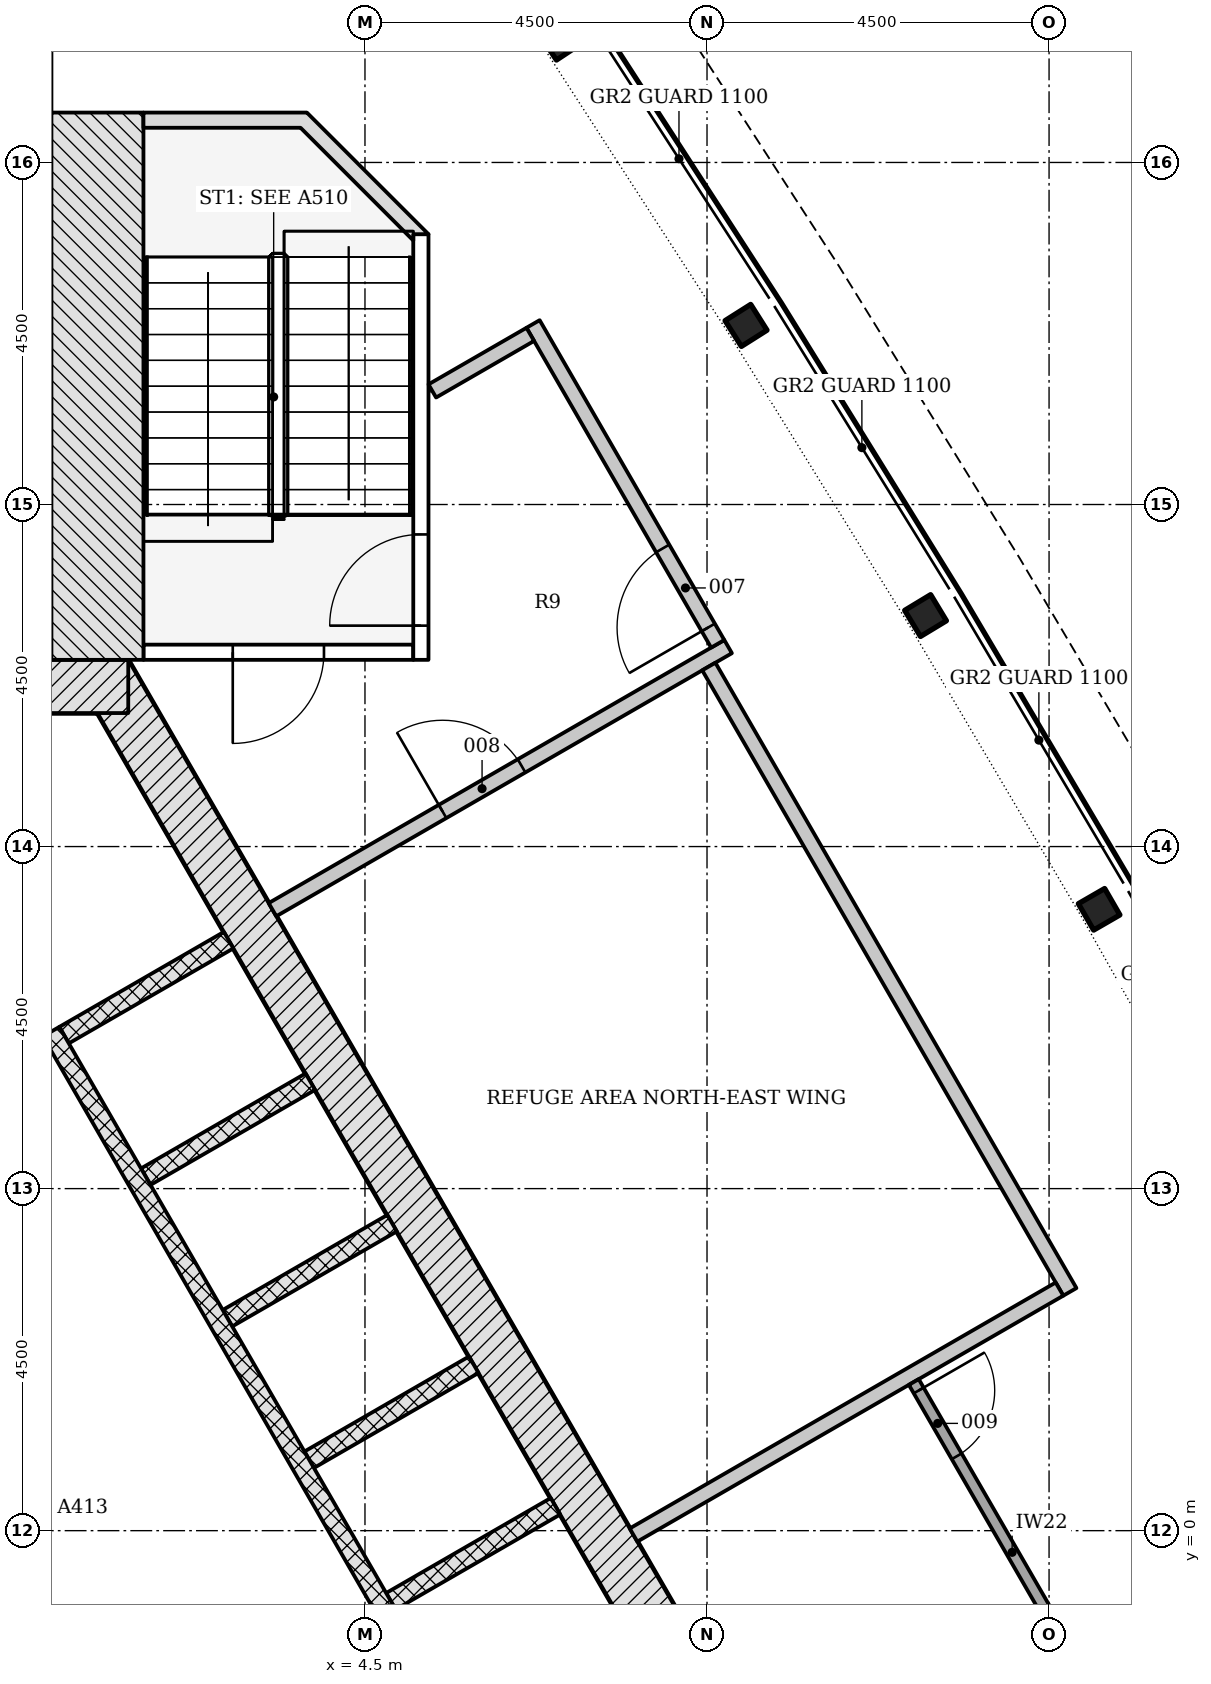
"""IFC4 building model, lengths in metres.
Left out: names, types, materials, properties, quantities, classifications, styles, units other than length and angle.
Written with IfcOpenShell. Run it as: python <this file> out.ifc"""

import sys

from ifc_helpers import new_model, si_unit, direction, frame, frame_2d, origin, origin_2d, place, context, subcontext, project, spatial, polyline, rectangle, i_section, outline, extrude, element, fill, save


model = new_model("IFC4")
c1 = context("Model", 3, precision=1e-05, world=origin(), true_north=direction((0.0, 1.0)))
c2 = subcontext(c1, "Body", "Model", "MODEL_VIEW")
j1 = project(units=[si_unit("LENGTHUNIT", "METRE"), si_unit("PLANEANGLEUNIT", "RADIAN")], contexts=[c1])
p1 = place(None, origin())
s1 = spatial("IfcSite", under=j1, at=p1, CompositionType="ELEMENT")
p2 = place(p1, origin())
s2 = spatial("IfcBuilding", under=s1, at=p2, CompositionType="ELEMENT")
p3 = place(p2, frame((0.0, 0.0, 127.5)))
s3 = spatial("IfcBuildingStorey", under=s2, at=p3, CompositionType="ELEMENT", Elevation=127.5)
p4 = place(p3, frame((10.311, -4.703, -0.3), z_axis=(0.0, 0.0, 1.0), x_axis=(-0.500001446645, 0.866024568562, 0.0)))
e1 = element("IfcWall", 1, at=p4, inside=s3, PredefinedType="SHEAR", context=c2, shape_type="SweptSolid", body=[
    extrude(rectangle(XDim=18.458, YDim=0.7, at=frame_2d((9.229, 0.0))), origin(), (0.0, 0.0, 1.0), 7.2),
])
p5 = place(p3, frame((1.386, 11.106, -0.3), z_axis=(0.0, 0.0, 1.0), x_axis=(-1.0, 0.0, 0.0)))
e2 = element("IfcWall", 2, at=p5, inside=s3, PredefinedType="SHEAR", context=c2, shape_type="SweptSolid", body=[
    extrude(rectangle(XDim=2.771, YDim=0.7, at=frame_2d((1.386, 0.0))), origin(), (0.0, 0.0, 1.0), 7.2),
])
for number, where, z_axis, x_axis in (
    (3, (14.159, 8.175, -0.3), (0.0, 0.0, 1.0), (-0.5, 0.866, 0.0)),
    (4, (11.875, 12.039, -0.3), (0.0, 0.0, 1.0), (-0.517, 0.856, 0.0)),
    (5, (9.513, 15.856, -0.3), (0.0, 0.0, 1.0), (-0.535, 0.845, 0.0)),
    (6, (7.075, 19.625, -0.3), (0.0, 0.0, 1.0), (-0.552, 0.834, 0.0)),
):
    element("IfcColumn", number, at=place(p3, frame(where, z_axis=z_axis, x_axis=x_axis)), inside=s3, PredefinedType="COLUMN", context=c2, shape_type="SweptSolid", body=[
        extrude(i_section(OverallWidth=0.401, OverallDepth=0.399, WebThickness=0.025, FlangeThickness=0.04, FilletRadius=0.015, at=origin_2d()), origin(), (0.0, 0.0, 1.0), 7.2),
    ])
p6 = place(p3, frame((7.006, 0.321, 0.0), z_axis=(0.0, 0.0, 1.0), x_axis=(-0.866022959057, -0.500004234368, 0.0)))
e7 = element("IfcWall", 7, at=p6, inside=s3, PredefinedType="PARTITIONING", context=c2, shape_type="SweptSolid", body=[
    extrude(rectangle(XDim=2.5, YDim=0.25, at=frame_2d((1.25, 0.0))), origin(), (0.0, 0.0, 1.0), 6.9),
])
p7 = place(p3, frame((5.931, 2.183, 0.0), z_axis=(0.0, 0.0, 1.0), x_axis=(-0.866047370643, -0.499961950354, 0.0)))
e8 = element("IfcWall", 8, at=p7, inside=s3, PredefinedType="PARTITIONING", context=c2, shape_type="SweptSolid", body=[
    extrude(rectangle(XDim=2.5, YDim=0.25, at=frame_2d((1.25, 0.0))), origin(), (0.0, 0.0, 1.0), 6.9),
])
for number, where, z_axis, x_axis in (
    (9, (4.856, 4.045, 0.0), (0.0, 0.0, 1.0), (-0.866, -0.5, 0.0)),
    (10, (3.781, 5.907, 0.0), (0.0, 0.0, 1.0), (-0.866, -0.5, 0.0)),
    (11, (2.706, 7.769, 0.0), (0.0, 0.0, 1.0), (-0.866, -0.5, 0.0)),
):
    element("IfcWall", number, at=place(p3, frame(where, z_axis=z_axis, x_axis=x_axis)), inside=s3, PredefinedType="PARTITIONING", context=c2, shape_type="SweptSolid", body=[
        extrude(rectangle(XDim=2.5, YDim=0.25, at=frame_2d((1.25, 0.0))), origin(), (0.0, 0.0, 1.0), 6.9),
    ])
p8 = place(p3, frame((5.87, -2.961, 0.0), z_axis=(0.0, 0.0, 1.0), x_axis=(-0.50000615651, 0.866021849293, 0.0)))
e12 = element("IfcWall", 12, at=p8, inside=s3, PredefinedType="PARTITIONING", context=c2, shape_type="SweptSolid", body=[
    extrude(rectangle(XDim=11.0, YDim=0.25, at=frame_2d((5.5, 0.0))), origin(), (0.0, 0.0, 1.0), 6.9),
])
p9 = place(p3, frame((5.135, 11.556, -0.3), z_axis=(0.0, 0.0, 1.0), x_axis=(-1.0, 0.0, 0.0)))
e13 = element("IfcWall", 13, at=p9, inside=s3, PredefinedType="SHEAR", context=c2, shape_type="SweptSolid", body=[
    extrude(rectangle(XDim=3.55, YDim=0.2, at=frame_2d((1.775, 0.0))), origin(), (0.0, 0.0, 1.0), 7.2),
])
p10 = place(p9, frame((1.175, 0.0, 0.3)))
e14 = element("IfcOpeningElement", 14, at=p10, cuts=e13, PredefinedType="OPENING", context=c2, shape_type="SweptSolid", body=[
    extrude(rectangle(XDim=1.2, YDim=2.1, at=frame_2d((0.6, 1.05))), frame((0.0, 0.11, 0.0), z_axis=(0.0, -1.0, 0.0), x_axis=(1.0, 0.0, 0.0)), (0.0, 0.0, 1.0), 0.22),
])
p11 = place(p3, frame((5.236, 11.456, -0.3), z_axis=(0.0, 0.0, 1.0), x_axis=(0.0, 1.0, 0.0)))
e15 = element("IfcWall", 15, at=p11, inside=s3, PredefinedType="SHEAR", context=c2, shape_type="SweptSolid", body=[
    extrude(rectangle(XDim=5.6, YDim=0.2, at=frame_2d((2.8, 0.0))), origin(), (0.0, 0.0, 1.0), 7.2),
])
p12 = place(p11, frame((0.45, 0.0, 0.3)))
e16 = element("IfcOpeningElement", 16, at=p12, cuts=e15, PredefinedType="OPENING", context=c2, shape_type="SweptSolid", body=[
    extrude(rectangle(XDim=1.2, YDim=2.1, at=frame_2d((0.6, 1.05))), frame((0.0, 0.11, 0.0), z_axis=(0.0, -1.0, 0.0), x_axis=(1.0, 0.0, 0.0)), (0.0, 0.0, 1.0), 0.22),
])
p13 = place(p3, frame((0.98, 11.456, -0.3), z_axis=(0.0, 0.0, 1.0), x_axis=(0.0, 1.0, 0.0)))
e17 = element("IfcWall", 17, at=p13, inside=s3, PredefinedType="SHEAR", context=c2, shape_type="SweptSolid", body=[
    extrude(rectangle(XDim=7.2, YDim=1.211, at=frame_2d((3.6, 0.0))), origin(), (0.0, 0.0, 1.0), 7.2),
])
p14 = place(p3, frame((0.0, 0.0, -0.3)))
e18 = element("IfcWall", 18, at=p14, inside=s3, PredefinedType="SHEAR", context=c2, shape_type="SweptSolid", body=[
    extrude(outline(polyline([(5.336, 17.056), (3.736, 18.656), (1.586, 18.656), (1.586, 18.456), (3.653, 18.456), (5.135, 16.974), (5.135, 17.056), (5.135, 17.056), (5.135, 17.056), (5.135, 17.056), (5.135, 17.056), (5.135, 17.056), (5.135, 17.056), (5.135, 17.056), (5.135, 17.056), (5.135, 17.056), (5.135, 17.056), (5.135, 17.056), (5.135, 17.056), (5.135, 17.056), (5.135, 17.056), (5.135, 17.056), (5.135, 17.056), (5.336, 17.056)])), origin(), (0.0, 0.0, 1.0), 7.2),
])
p15 = place(p3, frame((3.283, 8.17, 0.0), z_axis=(0.0, 0.0, 1.0), x_axis=(0.866035807126, 0.499981980451, 0.0)))
e19 = element("IfcWall", 19, at=p15, inside=s3, PredefinedType="PARTITIONING", context=c2, shape_type="SweptSolid", body=[
    extrude(rectangle(XDim=6.922, YDim=0.2, at=frame_2d((3.461, 0.0))), origin(), (0.0, 0.0, 1.0), 6.9),
])
p16 = place(p15, frame((2.584, 0.0, 0.0)))
e20 = element("IfcOpeningElement", 20, at=p16, cuts=e19, PredefinedType="OPENING", context=c2, shape_type="SweptSolid", body=[
    extrude(rectangle(XDim=1.2, YDim=2.1, at=frame_2d((0.6, 1.05))), frame((0.0, 0.11, 0.0), z_axis=(0.0, -1.0, 0.0), x_axis=(1.0, 0.0, 0.0)), (0.0, 0.0, 1.0), 0.22),
])
p17 = place(p3, frame((9.024, 11.369, 0.0), z_axis=(0.0, 0.0, 1.0), x_axis=(0.499997557548, -0.86602681393, 0.0)))
e21 = element("IfcWall", 21, at=p17, inside=s3, PredefinedType="PARTITIONING", context=c2, shape_type="SweptSolid", body=[
    extrude(rectangle(XDim=9.5, YDim=0.2, at=frame_2d((4.75, 0.0))), origin(), (0.0, 0.0, 1.0), 6.347),
])
p18 = place(p3, frame((9.141, 11.667, 0.0), z_axis=(0.0, 0.0, 1.0), x_axis=(-0.500013872438, 0.86601739438, 0.0)))
e22 = element("IfcWall", 22, at=p18, inside=s3, PredefinedType="PARTITIONING", context=c2, shape_type="SweptSolid", body=[
    extrude(rectangle(XDim=4.859, YDim=0.2, at=frame_2d((2.429, 0.0))), origin(), (0.0, 0.0, 1.0), 6.423),
])
p19 = place(p18, frame((0.249, 0.0, 0.0)))
e23 = element("IfcOpeningElement", 23, at=p19, cuts=e22, PredefinedType="OPENING", context=c2, shape_type="SweptSolid", body=[
    extrude(rectangle(XDim=1.2, YDim=2.1, at=frame_2d((0.6, 1.05))), frame((0.0, 0.11, 0.0), z_axis=(0.0, -1.0, 0.0), x_axis=(1.0, 0.0, 0.0)), (0.0, 0.0, 1.0), 0.22),
])
p20 = place(p3, frame((6.675, 15.739, 0.0), z_axis=(0.0, 0.0, 1.0), x_axis=(-0.866024464444, -0.500001626982, 0.0)))
e24 = element("IfcWall", 24, at=p20, inside=s3, PredefinedType="PARTITIONING", context=c2, shape_type="SweptSolid", body=[
    extrude(rectangle(XDim=1.489, YDim=0.2, at=frame_2d((0.744, 0.0))), origin(), (0.0, 0.0, 1.0), 6.9),
])
p21 = place(p3, frame((8.033, -0.058, 0.0), z_axis=(0.0, 0.0, 1.0), x_axis=(0.866017203851, 0.500014202433, 0.0)))
e25 = element("IfcWall", 25, at=p21, inside=s3, PredefinedType="PARTITIONING", context=c2, shape_type="SweptSolid", body=[
    extrude(rectangle(XDim=6.471, YDim=0.2, at=frame_2d((3.235, 0.0))), origin(), (0.0, 0.0, 1.0), 6.9),
])
p22 = place(p3, frame((11.72, 1.956, 0.0), z_axis=(0.0, 0.0, 1.0), x_axis=(0.500020560727, -0.866013532718, 0.0)))
e26 = element("IfcWall", 26, at=p22, inside=s3, PredefinedType="PARTITIONING", context=c2, shape_type="SweptSolid", body=[
    extrude(rectangle(XDim=5.175, YDim=0.15, at=frame_2d((2.587, 0.0))), origin(), (0.0, 0.0, 1.0), 6.347),
])
p23 = place(p22, frame((0.129, 0.0, 0.0)))
e27 = element("IfcOpeningElement", 27, at=p23, cuts=e26, PredefinedType="OPENING", context=c2, shape_type="SweptSolid", body=[
    extrude(rectangle(XDim=1.0, YDim=2.1, at=frame_2d((0.5, 1.05))), frame((0.0, 0.085, 0.0), z_axis=(0.0, -1.0, 0.0), x_axis=(1.0, 0.0, 0.0)), (0.0, 0.0, 1.0), 0.17),
])
p24 = place(p10, origin())
e28 = element("IfcDoor", 28, at=p24, inside=s3, OperationType="SINGLE_SWING_RIGHT", PredefinedType="DOOR", context=c2, shape_type="SweptSolid", body=[
    extrude(rectangle(XDim=1.2, YDim=2.1, at=frame_2d((0.6, 1.05))), frame((0.0, 0.025, 0.0), z_axis=(0.0, -1.0, 0.0), x_axis=(1.0, 0.0, 0.0)), (0.0, 0.0, 1.0), 0.05),
])
fill(e14, e28)
p25 = place(p12, origin())
e29 = element("IfcDoor", 29, at=p25, inside=s3, OperationType="SINGLE_SWING_LEFT", PredefinedType="DOOR", context=c2, shape_type="SweptSolid", body=[
    extrude(rectangle(XDim=1.2, YDim=2.1, at=frame_2d((0.6, 1.05))), frame((0.0, 0.025, 0.0), z_axis=(0.0, -1.0, 0.0), x_axis=(1.0, 0.0, 0.0)), (0.0, 0.0, 1.0), 0.05),
])
fill(e16, e29)
p26 = place(p19, origin())
e30 = element("IfcDoor", 30, at=p26, inside=s3, OperationType="SINGLE_SWING_LEFT", PredefinedType="DOOR", context=c2, shape_type="SweptSolid", body=[
    extrude(rectangle(XDim=1.2, YDim=2.1, at=frame_2d((0.6, 1.05))), frame((0.0, 0.025, 0.0), z_axis=(0.0, -1.0, 0.0), x_axis=(1.0, 0.0, 0.0)), (0.0, 0.0, 1.0), 0.05),
])
fill(e23, e30)
p27 = place(p16, origin())
e31 = element("IfcDoor", 31, at=p27, inside=s3, OperationType="SINGLE_SWING_LEFT", PredefinedType="DOOR", context=c2, shape_type="SweptSolid", body=[
    extrude(rectangle(XDim=1.2, YDim=2.1, at=frame_2d((0.6, 1.05))), frame((0.0, 0.025, 0.0), z_axis=(0.0, -1.0, 0.0), x_axis=(1.0, 0.0, 0.0)), (0.0, 0.0, 1.0), 0.05),
])
fill(e20, e31)
p28 = place(p23, origin())
e32 = element("IfcDoor", 32, at=p28, inside=s3, OperationType="SINGLE_SWING_LEFT", PredefinedType="DOOR", context=c2, shape_type="SweptSolid", body=[
    extrude(rectangle(XDim=1.0, YDim=2.1, at=frame_2d((0.5, 1.05))), frame((0.0, 0.025, 0.0), z_axis=(0.0, -1.0, 0.0), x_axis=(1.0, 0.0, 0.0)), (0.0, 0.0, 1.0), 0.05),
])
fill(e27, e32)
save(model, sys.argv[1])
